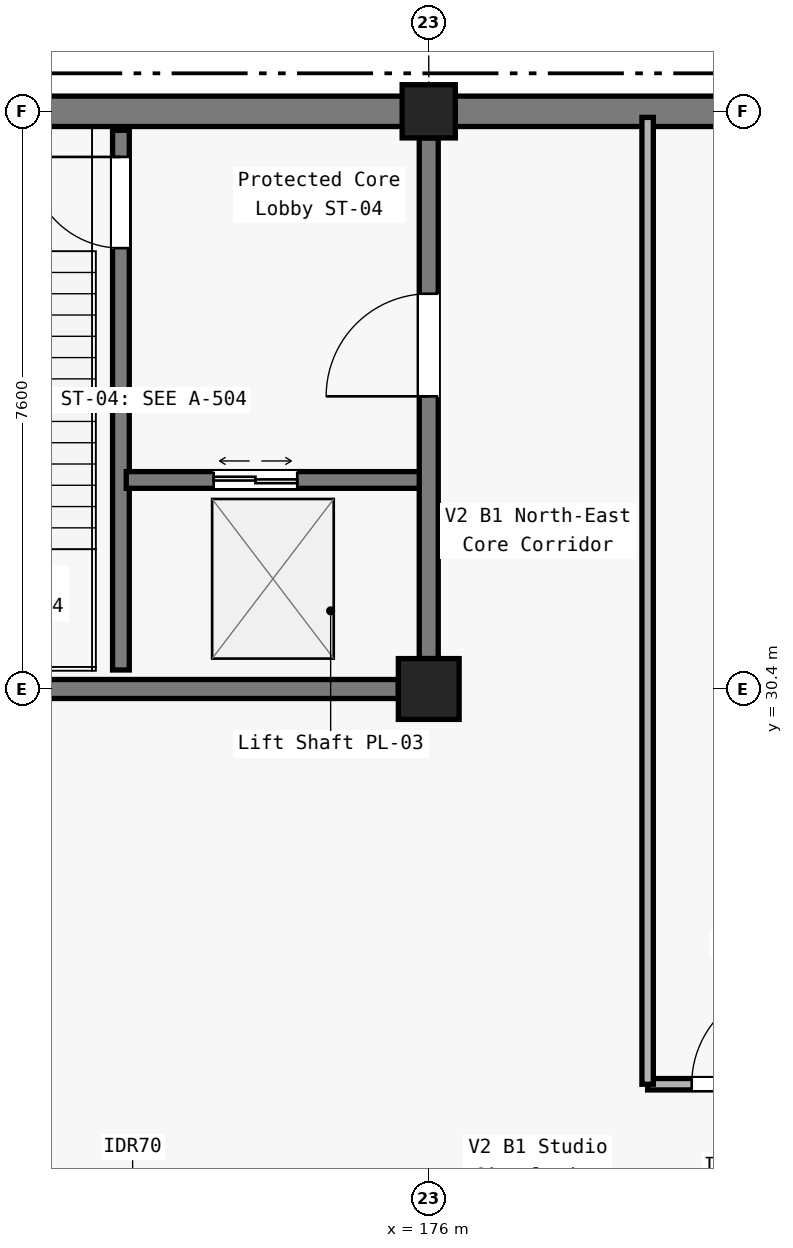
"""IFC4 building model, lengths in metres.
Left out: names, types, materials, properties, quantities, classifications, styles, units other than length and angle.
Written with IfcOpenShell. Run it as: python <this file> out.ifc"""

import sys

from ifc_helpers import new_model, si_unit, direction, frame, frame_2d, origin, origin_2d, place, context, subcontext, project, spatial, rectangle, extrude, element, fill, save


model = new_model("IFC4")
c1 = context("Model", 3, precision=1e-05, world=origin(), true_north=direction((0.0, 1.0)))
c2 = subcontext(c1, "Body", "Model", "MODEL_VIEW")
j1 = project(units=[si_unit("LENGTHUNIT", "METRE"), si_unit("PLANEANGLEUNIT", "RADIAN")], contexts=[c1])
p1 = place(None, origin())
s1 = spatial("IfcSite", under=j1, at=p1, CompositionType="ELEMENT")
p2 = place(p1, origin())
s2 = spatial("IfcBuilding", under=s1, at=p2, CompositionType="ELEMENT")
p3 = place(p2, frame((0.0, 0.0, -5.4)))
s3 = spatial("IfcBuildingStorey", under=s2, at=p3, CompositionType="ELEMENT", Elevation=-5.4)
for number, where, z_axis, x_axis in (
    (1, (176.0, 38.0, 0.0), (0.0, 0.0, 1.0), (-1.0, 0.0, 0.0)),
    (2, (184.0, 38.0, 0.0), (0.0, 0.0, 1.0), (-1.0, 0.0, 0.0)),
):
    element("IfcWall", number, at=place(p3, frame(where, z_axis=z_axis, x_axis=x_axis)), inside=s3, PredefinedType="USERDEFINED", context=c2, shape_type="SweptSolid", body=[
        extrude(rectangle(XDim=8.0, YDim=0.4, at=frame_2d((4.0, 0.0))), origin(), (0.0, 0.0, 1.0), 5.08),
    ])
p4 = place(p3, frame((176.0, 30.4, 0.0), z_axis=(0.0, 0.0, 1.0), x_axis=(1.0, 0.0, 0.0)))
e3 = element("IfcColumn", 3, at=p4, inside=s3, PredefinedType="COLUMN", context=c2, shape_type="SweptSolid", body=[
    extrude(rectangle(XDim=0.8, YDim=0.8, at=origin_2d()), origin(), (0.0, 0.0, 1.0), 5.4),
])
p5 = place(p3, frame((176.0, 38.0, 0.0), z_axis=(0.0, 0.0, 1.0), x_axis=(1.0, 0.0, 0.0)))
e4 = element("IfcColumn", 4, at=p5, inside=s3, PredefinedType="COLUMN", context=c2, shape_type="SweptSolid", body=[
    extrude(rectangle(XDim=0.7, YDim=0.7, at=origin_2d()), origin(), (0.0, 0.0, 1.0), 5.4),
])
p6 = place(p3, frame((168.325, 30.4, 0.0), z_axis=(0.0, 0.0, 1.0), x_axis=(1.0, 0.0, 0.0)))
e5 = element("IfcWall", 5, at=p6, inside=s3, PredefinedType="SOLIDWALL", context=c2, shape_type="SweptSolid", body=[
    extrude(rectangle(XDim=7.275, YDim=0.25, at=frame_2d((3.638, 0.0))), origin(), (0.0, 0.0, 1.0), 4.22),
])
p7 = place(p3, frame((171.95, 30.65, 0.0), z_axis=(0.0, 0.0, 1.0), x_axis=(0.0, 1.0, 0.0)))
e6 = element("IfcWall", 6, at=p7, inside=s3, PredefinedType="SOLIDWALL", context=c2, shape_type="SweptSolid", body=[
    extrude(rectangle(XDim=7.1, YDim=0.22, at=frame_2d((3.55, 0.0))), origin(), (0.0, 0.0, 1.0), 5.08),
])
p8 = place(p7, frame((5.55, 0.0, 0.0)))
e7 = element("IfcOpeningElement", 7, at=p8, cuts=e6, PredefinedType="OPENING", context=c2, shape_type="SweptSolid", body=[
    extrude(rectangle(XDim=1.2, YDim=2.15, at=frame_2d((0.6, 1.075))), frame((0.0, 0.12, 0.0), z_axis=(0.0, -1.0, 0.0), x_axis=(1.0, 0.0, 0.0)), (0.0, 0.0, 1.0), 0.24),
])
p9 = place(p3, frame((172.02, 33.15, 0.0), z_axis=(0.0, 0.0, 1.0), x_axis=(1.0, 0.0, 0.0)))
e8 = element("IfcWall", 8, at=p9, inside=s3, PredefinedType="SOLIDWALL", context=c2, shape_type="SweptSolid", body=[
    extrude(rectangle(XDim=3.93, YDim=0.22, at=frame_2d((1.965, 0.0))), origin(), (0.0, 0.0, 1.0), 4.38),
])
p10 = place(p9, frame((1.15, 0.0, 0.0)))
e9 = element("IfcOpeningElement", 9, at=p10, cuts=e8, PredefinedType="OPENING", context=c2, shape_type="SweptSolid", body=[
    extrude(rectangle(XDim=1.1, YDim=2.2, at=frame_2d((0.55, 1.1))), frame((0.0, 0.12, 0.0), z_axis=(0.0, -1.0, 0.0), x_axis=(1.0, 0.0, 0.0)), (0.0, 0.0, 1.0), 0.24),
])
p11 = place(p3, frame((176.0, 30.8, 0.0), z_axis=(0.0, 0.0, 1.0), x_axis=(0.0, 1.0, 0.0)))
e10 = element("IfcWall", 10, at=p11, inside=s3, PredefinedType="SOLIDWALL", context=c2, shape_type="SweptSolid", body=[
    extrude(rectangle(XDim=6.85, YDim=0.25, at=frame_2d((3.425, 0.0))), origin(), (0.0, 0.0, 1.0), 4.205),
])
p12 = place(p11, frame((3.45, 0.0, 0.0)))
e11 = element("IfcOpeningElement", 11, at=p12, cuts=e10, PredefinedType="OPENING", context=c2, shape_type="SweptSolid", body=[
    extrude(rectangle(XDim=1.35, YDim=2.2, at=frame_2d((0.675, 1.1))), frame((0.0, 0.135, 0.0), z_axis=(0.0, -1.0, 0.0), x_axis=(1.0, 0.0, 0.0)), (0.0, 0.0, 1.0), 0.27),
])
p13 = place(p3, frame((178.88, 25.2, 0.0), z_axis=(0.0, 0.0, 1.0), x_axis=(1.0, 0.0, 0.0)))
e12 = element("IfcWall", 12, at=p13, inside=s3, PredefinedType="PARTITIONING", context=c2, shape_type="SweptSolid", body=[
    extrude(rectangle(XDim=5.04, YDim=0.15, at=frame_2d((2.52, 0.0))), origin(), (0.0, 0.0, 1.0), 4.45),
])
p14 = place(p13, frame((0.58, 0.0, 0.0)))
e13 = element("IfcOpeningElement", 13, at=p14, cuts=e12, PredefinedType="OPENING", context=c2, shape_type="SweptSolid", body=[
    extrude(rectangle(XDim=1.3, YDim=2.2, at=frame_2d((0.65, 1.1))), frame((0.0, 0.085, 0.0), z_axis=(0.0, -1.0, 0.0), x_axis=(1.0, 0.0, 0.0)), (0.0, 0.0, 1.0), 0.17),
])
p15 = place(p3, frame((178.88, 25.2, 0.0), z_axis=(0.0, 0.0, 1.0), x_axis=(0.0, 1.0, 0.0)))
e14 = element("IfcWall", 14, at=p15, inside=s3, PredefinedType="PARTITIONING", context=c2, shape_type="SweptSolid", body=[
    extrude(rectangle(XDim=12.72, YDim=0.15, at=frame_2d((6.36, 0.0))), origin(), (0.0, 0.0, 1.0), 4.205),
])
p16 = place(p8, origin())
e15 = element("IfcDoor", 15, at=p16, inside=s3, OperationType="SINGLE_SWING_RIGHT", PredefinedType="DOOR", context=c2, shape_type="SweptSolid", body=[
    extrude(rectangle(XDim=1.2, YDim=2.15, at=frame_2d((0.6, 1.075))), frame((0.0, 0.025, 0.0), z_axis=(0.0, -1.0, 0.0), x_axis=(1.0, 0.0, 0.0)), (0.0, 0.0, 1.0), 0.05),
])
fill(e7, e15)
p17 = place(p10, origin())
e16 = element("IfcDoor", 16, at=p17, inside=s3, OperationType="DOUBLE_DOOR_SLIDING", PredefinedType="DOOR", context=c2, shape_type="SweptSolid", body=[
    extrude(rectangle(XDim=1.1, YDim=2.2, at=frame_2d((0.55, 1.1))), frame((0.0, 0.025, 0.0), z_axis=(0.0, -1.0, 0.0), x_axis=(1.0, 0.0, 0.0)), (0.0, 0.0, 1.0), 0.05),
])
fill(e9, e16)
p18 = place(p12, origin())
e17 = element("IfcDoor", 17, at=p18, inside=s3, OperationType="SINGLE_SWING_LEFT", PredefinedType="DOOR", context=c2, shape_type="SweptSolid", body=[
    extrude(rectangle(XDim=1.35, YDim=2.2, at=frame_2d((0.675, 1.1))), frame((0.0, 0.025, 0.0), z_axis=(0.0, -1.0, 0.0), x_axis=(1.0, 0.0, 0.0)), (0.0, 0.0, 1.0), 0.05),
])
fill(e11, e17)
p19 = place(p14, origin())
e18 = element("IfcDoor", 18, at=p19, inside=s3, OperationType="SINGLE_SWING_RIGHT", PredefinedType="DOOR", context=c2, shape_type="SweptSolid", body=[
    extrude(rectangle(XDim=1.3, YDim=2.2, at=frame_2d((0.65, 1.1))), frame((0.0, 0.025, 0.0), z_axis=(0.0, -1.0, 0.0), x_axis=(1.0, 0.0, 0.0)), (0.0, 0.0, 1.0), 0.05),
])
fill(e13, e18)
save(model, sys.argv[1])
